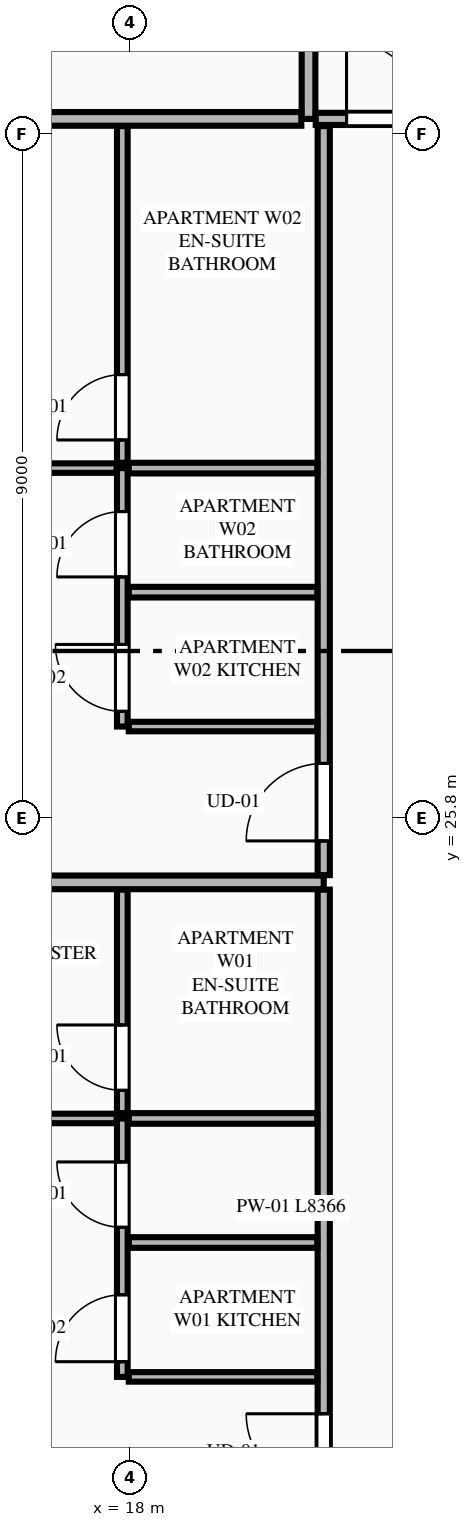
"""IFC4 building model, lengths in metres.
Left out: names, types, materials, properties, quantities, classifications, styles, units other than length and angle.
Written with IfcOpenShell. Run it as: python <this file> out.ifc"""

import sys

from ifc_helpers import new_model, si_unit, direction, frame, frame_2d, origin, place, context, subcontext, project, spatial, rectangle, extrude, element, fill, save


model = new_model("IFC4")
c1 = context("Model", 3, precision=1e-05, world=origin(), true_north=direction((0.0, 1.0)))
c2 = subcontext(c1, "Body", "Model", "MODEL_VIEW")
j1 = project(units=[si_unit("LENGTHUNIT", "METRE"), si_unit("PLANEANGLEUNIT", "RADIAN")], contexts=[c1])
p1 = place(None, origin())
s1 = spatial("IfcSite", under=j1, at=p1, CompositionType="ELEMENT")
p2 = place(p1, origin())
s2 = spatial("IfcBuilding", under=s1, at=p2, CompositionType="ELEMENT")
p3 = place(p2, frame((0.0, 0.0, 259.85)))
s3 = spatial("IfcBuildingStorey", under=s2, at=p3, CompositionType="ELEMENT", Elevation=259.85)
p4 = place(p3, frame((20.35, 35.0, 0.0), z_axis=(0.0, 0.0, 1.0), x_axis=(0.0, 1.0, 0.0)))
e1 = element("IfcWall", 1, at=p4, inside=s3, PredefinedType="PARTITIONING", context=c2, shape_type="SweptSolid", body=[
    extrude(rectangle(XDim=8.481, YDim=0.18, at=frame_2d((4.24, 0.0))), origin(), (0.0, 0.0, 1.0), 3.45),
])
p5 = place(p3, frame((20.445, 35.0, 0.0), z_axis=(0.0, 0.0, 1.0), x_axis=(1.0, 0.0, 0.0)))
e2 = element("IfcWall", 2, at=p5, inside=s3, PredefinedType="PARTITIONING", context=c2, shape_type="SweptSolid", body=[
    extrude(rectangle(XDim=15.114, YDim=0.16, at=frame_2d((7.557, 0.0))), origin(), (0.0, 0.0, 1.0), 3.45),
])
p6 = place(p5, frame((0.405, 0.0, 0.0)))
e3 = element("IfcOpeningElement", 3, at=p6, cuts=e2, PredefinedType="OPENING", context=c2, shape_type="SweptSolid", body=[
    extrude(rectangle(XDim=1.02, YDim=2.25, at=frame_2d((0.51, 1.125))), frame((0.0, 0.09, 0.0), z_axis=(0.0, -1.0, 0.0), x_axis=(1.0, 0.0, 0.0)), (0.0, 0.0, 1.0), 0.18),
])
p7 = place(p3, frame((15.933, 35.0, 0.0), z_axis=(0.0, 0.0, 1.0), x_axis=(1.0, 0.0, 0.0)))
e4 = element("IfcWall", 4, at=p7, inside=s3, PredefinedType="PARTITIONING", context=c2, shape_type="SweptSolid", body=[
    extrude(rectangle(XDim=4.322, YDim=0.18, at=frame_2d((2.161, 0.0))), origin(), (0.0, 0.0, 1.0), 3.45),
])
p8 = place(p3, frame((20.55, 16.495, 0.0), z_axis=(0.0, 0.0, 1.0), x_axis=(0.0, 1.0, 0.0)))
e5 = element("IfcWall", 5, at=p8, inside=s3, PredefinedType="PARTITIONING", context=c2, shape_type="SweptSolid", body=[
    extrude(rectangle(XDim=8.366, YDim=0.16, at=frame_2d((4.183, 0.0))), origin(), (0.0, 0.0, 1.0), 3.137),
])
p9 = place(p8, frame((0.45, 0.0, 0.0)))
e6 = element("IfcOpeningElement", 6, at=p9, cuts=e5, PredefinedType="OPENING", context=c2, shape_type="SweptSolid", body=[
    extrude(rectangle(XDim=1.02, YDim=2.25, at=frame_2d((0.51, 1.125))), frame((0.0, 0.09, 0.0), z_axis=(0.0, -1.0, 0.0), x_axis=(1.0, 0.0, 0.0)), (0.0, 0.0, 1.0), 0.18),
])
p10 = place(p3, frame((17.985, 18.45, 0.0), z_axis=(0.0, 0.0, 1.0), x_axis=(1.0, 0.0, 0.0)))
e7 = element("IfcWall", 7, at=p10, inside=s3, PredefinedType="PARTITIONING", context=c2, shape_type="SweptSolid", body=[
    extrude(rectangle(XDim=2.48, YDim=0.125, at=frame_2d((1.24, 0.0))), origin(), (0.0, 0.0, 1.0), 3.45),
])
p11 = place(p3, frame((17.9, 18.45, 0.0), z_axis=(0.0, 0.0, 1.0), x_axis=(0.0, 1.0, 0.0)))
e8 = element("IfcWall", 8, at=p11, inside=s3, PredefinedType="PLUMBINGWALL", context=c2, shape_type="SweptSolid", body=[
    extrude(rectangle(XDim=3.4, YDim=0.14, at=frame_2d((1.7, 0.0))), origin(), (0.0, 0.0, 1.0), 3.45),
])
p12 = place(p11, frame((0.2, 0.0, 0.0)))
e9 = element("IfcOpeningElement", 9, at=p12, cuts=e8, PredefinedType="OPENING", context=c2, shape_type="SweptSolid", body=[
    extrude(rectangle(XDim=0.88, YDim=2.15, at=frame_2d((0.44, 1.075))), frame((0.0, 0.08, 0.0), z_axis=(0.0, -1.0, 0.0), x_axis=(1.0, 0.0, 0.0)), (0.0, 0.0, 1.0), 0.16),
])
p13 = place(p11, frame((1.968, 0.0, 0.0)))
e10 = element("IfcOpeningElement", 10, at=p13, cuts=e8, PredefinedType="OPENING", context=c2, shape_type="SweptSolid", body=[
    extrude(rectangle(XDim=0.86, YDim=2.1, at=frame_2d((0.43, 1.05))), frame((0.0, 0.08, 0.0), z_axis=(0.0, -1.0, 0.0), x_axis=(1.0, 0.0, 0.0)), (0.0, 0.0, 1.0), 0.16),
])
p14 = place(p3, frame((17.9, 21.92, 0.0), z_axis=(0.0, 0.0, 1.0), x_axis=(0.0, 1.0, 0.0)))
e11 = element("IfcWall", 11, at=p14, inside=s3, PredefinedType="PLUMBINGWALL", context=c2, shape_type="SweptSolid", body=[
    extrude(rectangle(XDim=2.941, YDim=0.14, at=frame_2d((1.471, 0.0))), origin(), (0.0, 0.0, 1.0), 3.45),
])
p15 = place(p14, frame((0.3, 0.0, 0.0)))
e12 = element("IfcOpeningElement", 12, at=p15, cuts=e11, PredefinedType="OPENING", context=c2, shape_type="SweptSolid", body=[
    extrude(rectangle(XDim=0.86, YDim=2.1, at=frame_2d((0.43, 1.05))), frame((0.0, 0.08, 0.0), z_axis=(0.0, -1.0, 0.0), x_axis=(1.0, 0.0, 0.0)), (0.0, 0.0, 1.0), 0.16),
])
p16 = place(p3, frame((17.985, 21.85, 0.0), z_axis=(0.0, 0.0, 1.0), x_axis=(1.0, 0.0, 0.0)))
e13 = element("IfcWall", 13, at=p16, inside=s3, PredefinedType="PLUMBINGWALL", context=c2, shape_type="SweptSolid", body=[
    extrude(rectangle(XDim=2.48, YDim=0.14, at=frame_2d((1.24, 0.0))), origin(), (0.0, 0.0, 1.0), 3.45),
])
p17 = place(p3, frame((13.262, 21.85, 0.0), z_axis=(0.0, 0.0, 1.0), x_axis=(1.0, 0.0, 0.0)))
e14 = element("IfcWall", 14, at=p17, inside=s3, PredefinedType="PARTITIONING", context=c2, shape_type="SweptSolid", body=[
    extrude(rectangle(XDim=4.563, YDim=0.125, at=frame_2d((2.281, 0.0))), origin(), (0.0, 0.0, 1.0), 3.45),
])
p18 = place(p17, frame((0.35, 0.0, 0.0)))
e15 = element("IfcOpeningElement", 15, at=p18, cuts=e14, PredefinedType="OPENING", context=c2, shape_type="SweptSolid", body=[
    extrude(rectangle(XDim=0.92, YDim=2.15, at=frame_2d((0.46, 1.075))), frame((0.0, 0.073, 0.0), z_axis=(0.0, -1.0, 0.0), x_axis=(1.0, 0.0, 0.0)), (0.0, 0.0, 1.0), 0.145),
])
p19 = place(p3, frame((17.985, 20.218, 0.0), z_axis=(0.0, 0.0, 1.0), x_axis=(1.0, 0.0, 0.0)))
e16 = element("IfcWall", 16, at=p19, inside=s3, PredefinedType="PLUMBINGWALL", context=c2, shape_type="SweptSolid", body=[
    extrude(rectangle(XDim=2.48, YDim=0.14, at=frame_2d((1.24, 0.0))), origin(), (0.0, 0.0, 1.0), 3.45),
])
p20 = place(p3, frame((11.707, 24.956, 0.0), z_axis=(0.0, 0.0, 1.0), x_axis=(1.0, 0.0, 0.0)))
e17 = element("IfcWall", 17, at=p20, inside=s3, PredefinedType="PARTITIONING", context=c2, shape_type="SweptSolid", body=[
    extrude(rectangle(XDim=8.843, YDim=0.18, at=frame_2d((4.421, 0.0))), origin(), (0.0, 0.0, 1.0), 3.45),
])
p21 = place(p3, frame((20.55, 25.051, 0.0), z_axis=(0.0, 0.0, 1.0), x_axis=(0.0, 1.0, 0.0)))
e18 = element("IfcWall", 18, at=p21, inside=s3, PredefinedType="PARTITIONING", context=c2, shape_type="SweptSolid", body=[
    extrude(rectangle(XDim=9.854, YDim=0.16, at=frame_2d((4.927, 0.0))), origin(), (0.0, 0.0, 1.0), 3.137),
])
p22 = place(p21, frame((0.45, 0.0, 0.0)))
e19 = element("IfcOpeningElement", 19, at=p22, cuts=e18, PredefinedType="OPENING", context=c2, shape_type="SweptSolid", body=[
    extrude(rectangle(XDim=1.02, YDim=2.25, at=frame_2d((0.51, 1.125))), frame((0.0, 0.09, 0.0), z_axis=(0.0, -1.0, 0.0), x_axis=(1.0, 0.0, 0.0)), (0.0, 0.0, 1.0), 0.18),
])
p23 = place(p3, frame((17.985, 27.006, 0.0), z_axis=(0.0, 0.0, 1.0), x_axis=(1.0, 0.0, 0.0)))
e20 = element("IfcWall", 20, at=p23, inside=s3, PredefinedType="PARTITIONING", context=c2, shape_type="SweptSolid", body=[
    extrude(rectangle(XDim=2.48, YDim=0.125, at=frame_2d((1.24, 0.0))), origin(), (0.0, 0.0, 1.0), 3.45),
])
p24 = place(p3, frame((17.9, 27.006, 0.0), z_axis=(0.0, 0.0, 1.0), x_axis=(0.0, 1.0, 0.0)))
e21 = element("IfcWall", 21, at=p24, inside=s3, PredefinedType="PLUMBINGWALL", context=c2, shape_type="SweptSolid", body=[
    extrude(rectangle(XDim=3.4, YDim=0.14, at=frame_2d((1.7, 0.0))), origin(), (0.0, 0.0, 1.0), 3.45),
])
p25 = place(p24, frame((0.2, 0.0, 0.0)))
e22 = element("IfcOpeningElement", 22, at=p25, cuts=e21, PredefinedType="OPENING", context=c2, shape_type="SweptSolid", body=[
    extrude(rectangle(XDim=0.88, YDim=2.15, at=frame_2d((0.44, 1.075))), frame((0.0, 0.08, 0.0), z_axis=(0.0, -1.0, 0.0), x_axis=(1.0, 0.0, 0.0)), (0.0, 0.0, 1.0), 0.16),
])
p26 = place(p24, frame((1.968, 0.0, 0.0)))
e23 = element("IfcOpeningElement", 23, at=p26, cuts=e21, PredefinedType="OPENING", context=c2, shape_type="SweptSolid", body=[
    extrude(rectangle(XDim=0.86, YDim=2.1, at=frame_2d((0.43, 1.05))), frame((0.0, 0.08, 0.0), z_axis=(0.0, -1.0, 0.0), x_axis=(1.0, 0.0, 0.0)), (0.0, 0.0, 1.0), 0.16),
])
p27 = place(p3, frame((17.9, 30.476, 0.0), z_axis=(0.0, 0.0, 1.0), x_axis=(0.0, 1.0, 0.0)))
e24 = element("IfcWall", 24, at=p27, inside=s3, PredefinedType="PLUMBINGWALL", context=c2, shape_type="SweptSolid", body=[
    extrude(rectangle(XDim=4.429, YDim=0.14, at=frame_2d((2.214, 0.0))), origin(), (0.0, 0.0, 1.0), 3.45),
])
p28 = place(p27, frame((0.3, 0.0, 0.0)))
e25 = element("IfcOpeningElement", 25, at=p28, cuts=e24, PredefinedType="OPENING", context=c2, shape_type="SweptSolid", body=[
    extrude(rectangle(XDim=0.86, YDim=2.1, at=frame_2d((0.43, 1.05))), frame((0.0, 0.08, 0.0), z_axis=(0.0, -1.0, 0.0), x_axis=(1.0, 0.0, 0.0)), (0.0, 0.0, 1.0), 0.16),
])
p29 = place(p3, frame((17.985, 30.406, 0.0), z_axis=(0.0, 0.0, 1.0), x_axis=(1.0, 0.0, 0.0)))
e26 = element("IfcWall", 26, at=p29, inside=s3, PredefinedType="PLUMBINGWALL", context=c2, shape_type="SweptSolid", body=[
    extrude(rectangle(XDim=2.48, YDim=0.14, at=frame_2d((1.24, 0.0))), origin(), (0.0, 0.0, 1.0), 3.45),
])
p30 = place(p3, frame((13.594, 30.406, 0.0), z_axis=(0.0, 0.0, 1.0), x_axis=(1.0, 0.0, 0.0)))
e27 = element("IfcWall", 27, at=p30, inside=s3, PredefinedType="PARTITIONING", context=c2, shape_type="SweptSolid", body=[
    extrude(rectangle(XDim=4.231, YDim=0.125, at=frame_2d((2.115, 0.0))), origin(), (0.0, 0.0, 1.0), 3.45),
])
p31 = place(p30, frame((0.35, 0.0, 0.0)))
e28 = element("IfcOpeningElement", 28, at=p31, cuts=e27, PredefinedType="OPENING", context=c2, shape_type="SweptSolid", body=[
    extrude(rectangle(XDim=0.92, YDim=2.15, at=frame_2d((0.46, 1.075))), frame((0.0, 0.073, 0.0), z_axis=(0.0, -1.0, 0.0), x_axis=(1.0, 0.0, 0.0)), (0.0, 0.0, 1.0), 0.145),
])
p32 = place(p3, frame((17.985, 28.774, 0.0), z_axis=(0.0, 0.0, 1.0), x_axis=(1.0, 0.0, 0.0)))
e29 = element("IfcWall", 29, at=p32, inside=s3, PredefinedType="PLUMBINGWALL", context=c2, shape_type="SweptSolid", body=[
    extrude(rectangle(XDim=2.48, YDim=0.14, at=frame_2d((1.24, 0.0))), origin(), (0.0, 0.0, 1.0), 3.45),
])
p33 = place(p6, origin())
e30 = element("IfcDoor", 30, at=p33, inside=s3, OperationType="SINGLE_SWING_LEFT", PredefinedType="DOOR", context=c2, shape_type="SweptSolid", body=[
    extrude(rectangle(XDim=1.02, YDim=2.25, at=frame_2d((0.51, 1.125))), frame((0.0, 0.025, 0.0), z_axis=(0.0, -1.0, 0.0), x_axis=(1.0, 0.0, 0.0)), (0.0, 0.0, 1.0), 0.05),
])
fill(e3, e30)
p34 = place(p12, origin())
e31 = element("IfcDoor", 31, at=p34, inside=s3, OperationType="SINGLE_SWING_LEFT", PredefinedType="DOOR", context=c2, shape_type="SweptSolid", body=[
    extrude(rectangle(XDim=0.88, YDim=2.15, at=frame_2d((0.44, 1.075))), frame((0.0, 0.025, 0.0), z_axis=(0.0, -1.0, 0.0), x_axis=(1.0, 0.0, 0.0)), (0.0, 0.0, 1.0), 0.05),
])
fill(e9, e31)
p35 = place(p13, origin())
e32 = element("IfcDoor", 32, at=p35, inside=s3, OperationType="SINGLE_SWING_RIGHT", PredefinedType="DOOR", context=c2, shape_type="SweptSolid", body=[
    extrude(rectangle(XDim=0.86, YDim=2.1, at=frame_2d((0.43, 1.05))), frame((0.0, 0.025, 0.0), z_axis=(0.0, -1.0, 0.0), x_axis=(1.0, 0.0, 0.0)), (0.0, 0.0, 1.0), 0.05),
])
fill(e10, e32)
p36 = place(p15, origin())
e33 = element("IfcDoor", 33, at=p36, inside=s3, OperationType="SINGLE_SWING_RIGHT", PredefinedType="DOOR", context=c2, shape_type="SweptSolid", body=[
    extrude(rectangle(XDim=0.86, YDim=2.1, at=frame_2d((0.43, 1.05))), frame((0.0, 0.025, 0.0), z_axis=(0.0, -1.0, 0.0), x_axis=(1.0, 0.0, 0.0)), (0.0, 0.0, 1.0), 0.05),
])
fill(e12, e33)
p37 = place(p9, origin())
e34 = element("IfcDoor", 34, at=p37, inside=s3, OperationType="SINGLE_SWING_RIGHT", PredefinedType="DOOR", context=c2, shape_type="SweptSolid", body=[
    extrude(rectangle(XDim=1.02, YDim=2.25, at=frame_2d((0.51, 1.125))), frame((0.0, 0.025, 0.0), z_axis=(0.0, -1.0, 0.0), x_axis=(1.0, 0.0, 0.0)), (0.0, 0.0, 1.0), 0.05),
])
fill(e6, e34)
p38 = place(p25, origin())
e35 = element("IfcDoor", 35, at=p38, inside=s3, OperationType="SINGLE_SWING_RIGHT", PredefinedType="DOOR", context=c2, shape_type="SweptSolid", body=[
    extrude(rectangle(XDim=0.88, YDim=2.15, at=frame_2d((0.44, 1.075))), frame((0.0, 0.025, 0.0), z_axis=(0.0, -1.0, 0.0), x_axis=(1.0, 0.0, 0.0)), (0.0, 0.0, 1.0), 0.05),
])
fill(e22, e35)
p39 = place(p26, origin())
e36 = element("IfcDoor", 36, at=p39, inside=s3, OperationType="SINGLE_SWING_LEFT", PredefinedType="DOOR", context=c2, shape_type="SweptSolid", body=[
    extrude(rectangle(XDim=0.86, YDim=2.1, at=frame_2d((0.43, 1.05))), frame((0.0, 0.025, 0.0), z_axis=(0.0, -1.0, 0.0), x_axis=(1.0, 0.0, 0.0)), (0.0, 0.0, 1.0), 0.05),
])
fill(e23, e36)
p40 = place(p28, origin())
e37 = element("IfcDoor", 37, at=p40, inside=s3, OperationType="SINGLE_SWING_LEFT", PredefinedType="DOOR", context=c2, shape_type="SweptSolid", body=[
    extrude(rectangle(XDim=0.86, YDim=2.1, at=frame_2d((0.43, 1.05))), frame((0.0, 0.025, 0.0), z_axis=(0.0, -1.0, 0.0), x_axis=(1.0, 0.0, 0.0)), (0.0, 0.0, 1.0), 0.05),
])
fill(e25, e37)
p41 = place(p22, origin())
e38 = element("IfcDoor", 38, at=p41, inside=s3, OperationType="SINGLE_SWING_LEFT", PredefinedType="DOOR", context=c2, shape_type="SweptSolid", body=[
    extrude(rectangle(XDim=1.02, YDim=2.25, at=frame_2d((0.51, 1.125))), frame((0.0, 0.025, 0.0), z_axis=(0.0, -1.0, 0.0), x_axis=(1.0, 0.0, 0.0)), (0.0, 0.0, 1.0), 0.05),
])
fill(e19, e38)
save(model, sys.argv[1])
